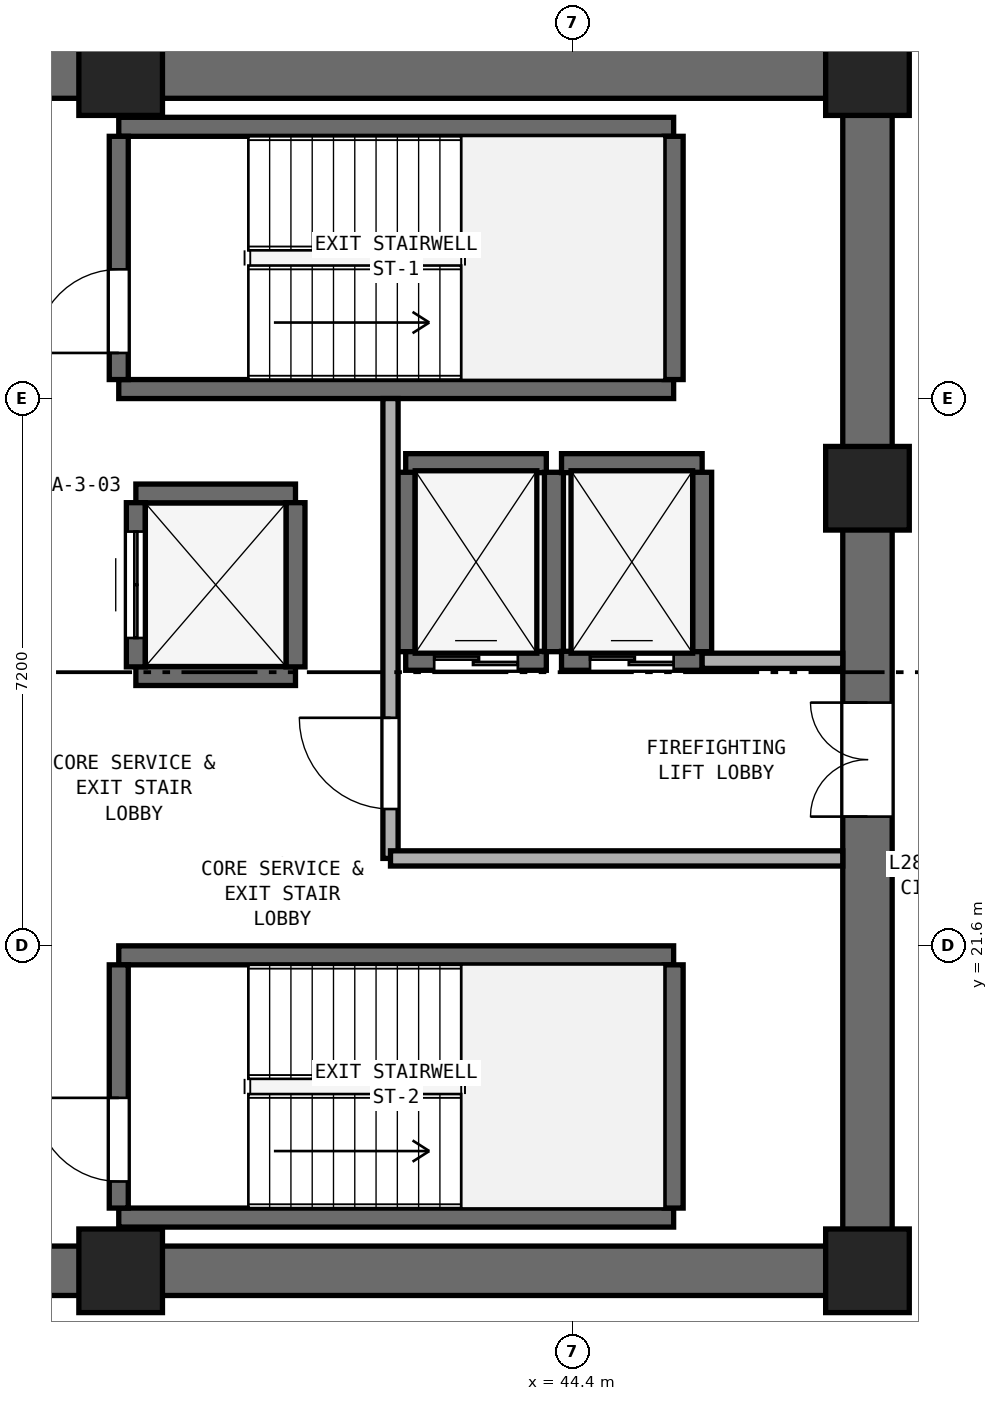
"""IFC4 building model, lengths in metres.
Left out: names, types, materials, properties, quantities, classifications, styles, units other than length and angle.
Written with IfcOpenShell. Run it as: python <this file> out.ifc"""

import sys

from ifc_helpers import new_model, si_unit, direction, frame, frame_2d, origin, origin_2d, place, context, subcontext, project, spatial, rectangle, extrude, element, fill, save


model = new_model("IFC4")
c1 = context("Model", 3, precision=1e-05, world=origin(), true_north=direction((0.0, 1.0)))
c2 = subcontext(c1, "Body", "Model", "MODEL_VIEW")
j1 = project(units=[si_unit("LENGTHUNIT", "METRE"), si_unit("PLANEANGLEUNIT", "RADIAN")], contexts=[c1])
p1 = place(None, origin())
s1 = spatial("IfcSite", under=j1, at=p1, CompositionType="ELEMENT")
p2 = place(p1, origin())
s2 = spatial("IfcBuilding", under=s1, at=p2, CompositionType="ELEMENT")
p3 = place(p2, frame((0.0, 0.0, 112.4)))
s3 = spatial("IfcBuildingStorey", under=s2, at=p3, CompositionType="ELEMENT", Elevation=112.4)
for number, where, z_axis, x_axis in (
    (1, (25.4, 17.325, 0.0), (0.0, 0.0, 1.0), (1.0, 0.0, 0.0)),
    (2, (25.4, 33.075, 0.0), (0.0, 0.0, 1.0), (1.0, 0.0, 0.0)),
):
    element("IfcWall", number, at=place(p3, frame(where, z_axis=z_axis, x_axis=x_axis)), inside=s3, PredefinedType="SHEAR", context=c2, shape_type="SweptSolid", body=[
        extrude(rectangle(XDim=23.2, YDim=0.65, at=frame_2d((11.6, 0.0))), origin(), (0.0, 0.0, 1.0), 3.525),
    ])
p4 = place(p3, frame((48.275, 17.65, 0.0), z_axis=(0.0, 0.0, 1.0), x_axis=(0.0, 1.0, 0.0)))
e3 = element("IfcWall", 3, at=p4, inside=s3, PredefinedType="SHEAR", context=c2, shape_type="SweptSolid", body=[
    extrude(rectangle(XDim=15.1, YDim=0.65, at=frame_2d((7.55, 0.0))), origin(), (0.0, 0.0, 1.0), 3.525),
])
p5 = place(p4, frame((5.65, 0.0, 0.0)))
e4 = element("IfcOpeningElement", 4, at=p5, cuts=e3, PredefinedType="OPENING", context=c2, shape_type="SweptSolid", body=[
    extrude(rectangle(XDim=1.5, YDim=2.15, at=frame_2d((0.75, 1.075))), frame((0.0, 0.335, 0.0), z_axis=(0.0, -1.0, 0.0), x_axis=(1.0, 0.0, 0.0)), (0.0, 0.0, 1.0), 0.67),
])
for number, where, z_axis, x_axis in (
    (5, (38.45, 17.325, 0.0), (0.0, 0.0, 1.0), (1.0, 0.0, 0.0)),
    (6, (48.275, 17.325, 0.0), (0.0, 0.0, 1.0), (1.0, 0.0, 0.0)),
    (7, (48.275, 27.62, 0.0), (0.0, 0.0, 1.0), (1.0, 0.0, 0.0)),
    (8, (48.275, 33.075, 0.0), (0.0, 0.0, 1.0), (1.0, 0.0, 0.0)),
    (9, (38.45, 33.075, 0.0), (0.0, 0.0, 1.0), (1.0, 0.0, 0.0)),
):
    element("IfcColumn", number, at=place(p3, frame(where, z_axis=z_axis, x_axis=x_axis)), inside=s3, PredefinedType="PILASTER", context=c2, shape_type="SweptSolid", body=[
        extrude(rectangle(XDim=1.1, YDim=1.1, at=origin_2d()), origin(), (0.0, 0.0, 1.0), 3.8),
    ])
for number, where, z_axis, x_axis in (
    (10, (38.425, 28.925, 0.0), (0.0, 0.0, 1.0), (1.0, 0.0, 0.0)),
    (11, (38.425, 32.375, 0.0), (0.0, 0.0, 1.0), (1.0, 0.0, 0.0)),
):
    element("IfcWall", number, at=place(p3, frame(where, z_axis=z_axis, x_axis=x_axis)), inside=s3, PredefinedType="SHEAR", context=c2, shape_type="SweptSolid", body=[
        extrude(rectangle(XDim=7.3, YDim=0.25, at=frame_2d((3.65, 0.0))), origin(), (0.0, 0.0, 1.0), 3.525),
    ])
p6 = place(p3, frame((38.425, 29.05, 0.0), z_axis=(0.0, 0.0, 1.0), x_axis=(0.0, 1.0, 0.0)))
e12 = element("IfcWall", 12, at=p6, inside=s3, PredefinedType="SHEAR", context=c2, shape_type="SweptSolid", body=[
    extrude(rectangle(XDim=3.2, YDim=0.25, at=frame_2d((1.6, 0.0))), origin(), (0.0, 0.0, 1.0), 3.525),
])
p7 = place(p6, frame((0.35, 0.0, 0.0)))
e13 = element("IfcOpeningElement", 13, at=p7, cuts=e12, PredefinedType="OPENING", context=c2, shape_type="SweptSolid", body=[
    extrude(rectangle(XDim=1.1, YDim=2.15, at=frame_2d((0.55, 1.075))), frame((0.0, 0.135, 0.0), z_axis=(0.0, -1.0, 0.0), x_axis=(1.0, 0.0, 0.0)), (0.0, 0.0, 1.0), 0.27),
])
p8 = place(p3, frame((45.725, 29.05, 0.0), z_axis=(0.0, 0.0, 1.0), x_axis=(0.0, 1.0, 0.0)))
e14 = element("IfcWall", 14, at=p8, inside=s3, PredefinedType="SHEAR", context=c2, shape_type="SweptSolid", body=[
    extrude(rectangle(XDim=3.2, YDim=0.25, at=frame_2d((1.6, 0.0))), origin(), (0.0, 0.0, 1.0), 3.525),
])
for number, where, z_axis, x_axis in (
    (15, (38.425, 18.025, 0.0), (0.0, 0.0, 1.0), (1.0, 0.0, 0.0)),
    (16, (38.425, 21.475, 0.0), (0.0, 0.0, 1.0), (1.0, 0.0, 0.0)),
):
    element("IfcWall", number, at=place(p3, frame(where, z_axis=z_axis, x_axis=x_axis)), inside=s3, PredefinedType="SHEAR", context=c2, shape_type="SweptSolid", body=[
        extrude(rectangle(XDim=7.3, YDim=0.25, at=frame_2d((3.65, 0.0))), origin(), (0.0, 0.0, 1.0), 3.525),
    ])
p9 = place(p3, frame((38.425, 18.15, 0.0), z_axis=(0.0, 0.0, 1.0), x_axis=(0.0, 1.0, 0.0)))
e17 = element("IfcWall", 17, at=p9, inside=s3, PredefinedType="SHEAR", context=c2, shape_type="SweptSolid", body=[
    extrude(rectangle(XDim=3.2, YDim=0.25, at=frame_2d((1.6, 0.0))), origin(), (0.0, 0.0, 1.0), 3.525),
])
p10 = place(p9, frame((0.35, 0.0, 0.0)))
e18 = element("IfcOpeningElement", 18, at=p10, cuts=e17, PredefinedType="OPENING", context=c2, shape_type="SweptSolid", body=[
    extrude(rectangle(XDim=1.1, YDim=2.15, at=frame_2d((0.55, 1.075))), frame((0.0, 0.135, 0.0), z_axis=(0.0, -1.0, 0.0), x_axis=(1.0, 0.0, 0.0)), (0.0, 0.0, 1.0), 0.27),
])
p11 = place(p3, frame((45.725, 18.15, 0.0), z_axis=(0.0, 0.0, 1.0), x_axis=(0.0, 1.0, 0.0)))
e19 = element("IfcWall", 19, at=p11, inside=s3, PredefinedType="SHEAR", context=c2, shape_type="SweptSolid", body=[
    extrude(rectangle(XDim=3.2, YDim=0.25, at=frame_2d((1.6, 0.0))), origin(), (0.0, 0.0, 1.0), 3.525),
])
p12 = place(p3, frame((42.2, 25.35, 0.0), z_axis=(0.0, 0.0, 1.0), x_axis=(1.0, 0.0, 0.0)))
e20 = element("IfcWall", 20, at=p12, inside=s3, PredefinedType="SHEAR", context=c2, shape_type="SweptSolid", body=[
    extrude(rectangle(XDim=1.85, YDim=0.25, at=frame_2d((0.925, 0.0))), origin(), (0.0, 0.0, 1.0), 3.525),
])
p13 = place(p12, frame((0.375, 0.0, 0.0)))
e21 = element("IfcOpeningElement", 21, at=p13, cuts=e20, PredefinedType="OPENING", context=c2, shape_type="SweptSolid", body=[
    extrude(rectangle(XDim=1.1, YDim=2.15, at=frame_2d((0.55, 1.075))), frame((0.0, 0.135, 0.0), z_axis=(0.0, -1.0, 0.0), x_axis=(1.0, 0.0, 0.0)), (0.0, 0.0, 1.0), 0.27),
])
p14 = place(p3, frame((42.2, 27.95, 0.0), z_axis=(0.0, 0.0, 1.0), x_axis=(1.0, 0.0, 0.0)))
e22 = element("IfcWall", 22, at=p14, inside=s3, PredefinedType="SHEAR", context=c2, shape_type="SweptSolid", body=[
    extrude(rectangle(XDim=1.85, YDim=0.25, at=frame_2d((0.925, 0.0))), origin(), (0.0, 0.0, 1.0), 3.525),
])
for number, where, z_axis, x_axis in (
    (23, (42.2, 25.47, 0.0), (0.0, 0.0, 1.0), (0.0, 1.0, 0.0)),
    (24, (44.15, 25.47, 0.0), (0.0, 0.0, 1.0), (0.0, 1.0, 0.0)),
):
    element("IfcWall", number, at=place(p3, frame(where, z_axis=z_axis, x_axis=x_axis)), inside=s3, PredefinedType="SHEAR", context=c2, shape_type="SweptSolid", body=[
        extrude(rectangle(XDim=2.36, YDim=0.25, at=frame_2d((1.18, 0.0))), origin(), (0.0, 0.0, 1.0), 3.525),
    ])
p15 = place(p3, frame((44.25, 25.35, 0.0), z_axis=(0.0, 0.0, 1.0), x_axis=(1.0, 0.0, 0.0)))
e25 = element("IfcWall", 25, at=p15, inside=s3, PredefinedType="SHEAR", context=c2, shape_type="SweptSolid", body=[
    extrude(rectangle(XDim=1.85, YDim=0.25, at=frame_2d((0.925, 0.0))), origin(), (0.0, 0.0, 1.0), 3.525),
])
p16 = place(p15, frame((0.375, 0.0, 0.0)))
e26 = element("IfcOpeningElement", 26, at=p16, cuts=e25, PredefinedType="OPENING", context=c2, shape_type="SweptSolid", body=[
    extrude(rectangle(XDim=1.1, YDim=2.15, at=frame_2d((0.55, 1.075))), frame((0.0, 0.135, 0.0), z_axis=(0.0, -1.0, 0.0), x_axis=(1.0, 0.0, 0.0)), (0.0, 0.0, 1.0), 0.27),
])
p17 = place(p3, frame((44.25, 27.95, 0.0), z_axis=(0.0, 0.0, 1.0), x_axis=(1.0, 0.0, 0.0)))
e27 = element("IfcWall", 27, at=p17, inside=s3, PredefinedType="SHEAR", context=c2, shape_type="SweptSolid", body=[
    extrude(rectangle(XDim=1.85, YDim=0.25, at=frame_2d((0.925, 0.0))), origin(), (0.0, 0.0, 1.0), 3.525),
])
p18 = place(p3, frame((46.1, 25.47, 0.0), z_axis=(0.0, 0.0, 1.0), x_axis=(0.0, 1.0, 0.0)))
e28 = element("IfcWall", 28, at=p18, inside=s3, PredefinedType="SHEAR", context=c2, shape_type="SweptSolid", body=[
    extrude(rectangle(XDim=2.36, YDim=0.25, at=frame_2d((1.18, 0.0))), origin(), (0.0, 0.0, 1.0), 3.525),
])
for number, where, z_axis, x_axis in (
    (29, (38.65, 25.15, 0.0), (0.0, 0.0, 1.0), (1.0, 0.0, 0.0)),
    (30, (38.65, 27.55, 0.0), (0.0, 0.0, 1.0), (1.0, 0.0, 0.0)),
):
    element("IfcWall", number, at=place(p3, frame(where, z_axis=z_axis, x_axis=x_axis)), inside=s3, PredefinedType="SHEAR", context=c2, shape_type="SweptSolid", body=[
        extrude(rectangle(XDim=2.1, YDim=0.25, at=frame_2d((1.05, 0.0))), origin(), (0.0, 0.0, 1.0), 3.525),
    ])
p19 = place(p3, frame((38.65, 25.27, 0.0), z_axis=(0.0, 0.0, 1.0), x_axis=(0.0, 1.0, 0.0)))
e31 = element("IfcWall", 31, at=p19, inside=s3, PredefinedType="SHEAR", context=c2, shape_type="SweptSolid", body=[
    extrude(rectangle(XDim=2.16, YDim=0.25, at=frame_2d((1.08, 0.0))), origin(), (0.0, 0.0, 1.0), 3.525),
])
p20 = place(p19, frame((0.38, 0.0, 0.0)))
e32 = element("IfcOpeningElement", 32, at=p20, cuts=e31, PredefinedType="OPENING", context=c2, shape_type="SweptSolid", body=[
    extrude(rectangle(XDim=1.4, YDim=2.2, at=frame_2d((0.7, 1.1))), frame((0.0, 0.135, 0.0), z_axis=(0.0, -1.0, 0.0), x_axis=(1.0, 0.0, 0.0)), (0.0, 0.0, 1.0), 0.27),
])
p21 = place(p3, frame((40.75, 25.27, 0.0), z_axis=(0.0, 0.0, 1.0), x_axis=(0.0, 1.0, 0.0)))
e33 = element("IfcWall", 33, at=p21, inside=s3, PredefinedType="SHEAR", context=c2, shape_type="SweptSolid", body=[
    extrude(rectangle(XDim=2.16, YDim=0.25, at=frame_2d((1.08, 0.0))), origin(), (0.0, 0.0, 1.0), 3.525),
])
p22 = place(p3, frame((42.0, 22.75, 0.0), z_axis=(0.0, 0.0, 1.0), x_axis=(0.0, 1.0, 0.0)))
e34 = element("IfcWall", 34, at=p22, inside=s3, PredefinedType="SOLIDWALL", context=c2, shape_type="SweptSolid", body=[
    extrude(rectangle(XDim=6.05, YDim=0.2, at=frame_2d((3.025, 0.0))), origin(), (0.0, 0.0, 1.0), 3.525),
])
p23 = place(p22, frame((0.65, 0.0, 0.0)))
e35 = element("IfcOpeningElement", 35, at=p23, cuts=e34, PredefinedType="OPENING", context=c2, shape_type="SweptSolid", body=[
    extrude(rectangle(XDim=1.2, YDim=2.15, at=frame_2d((0.6, 1.075))), frame((0.0, 0.11, 0.0), z_axis=(0.0, -1.0, 0.0), x_axis=(1.0, 0.0, 0.0)), (0.0, 0.0, 1.0), 0.22),
])
p24 = place(p3, frame((42.0, 22.75, 0.0), z_axis=(0.0, 0.0, 1.0), x_axis=(1.0, 0.0, 0.0)))
e36 = element("IfcWall", 36, at=p24, inside=s3, PredefinedType="SOLIDWALL", context=c2, shape_type="SweptSolid", body=[
    extrude(rectangle(XDim=5.95, YDim=0.2, at=frame_2d((2.975, 0.0))), origin(), (0.0, 0.0, 1.0), 3.525),
])
p25 = place(p3, frame((46.1, 25.35, 0.0), z_axis=(0.0, 0.0, 1.0), x_axis=(1.0, 0.0, 0.0)))
e37 = element("IfcWall", 37, at=p25, inside=s3, PredefinedType="SOLIDWALL", context=c2, shape_type="SweptSolid", body=[
    extrude(rectangle(XDim=1.85, YDim=0.2, at=frame_2d((0.925, 0.0))), origin(), (0.0, 0.0, 1.0), 3.525),
])
p26 = place(p7, origin())
e38 = element("IfcDoor", 38, at=p26, inside=s3, OperationType="SINGLE_SWING_LEFT", PredefinedType="DOOR", context=c2, shape_type="SweptSolid", body=[
    extrude(rectangle(XDim=1.1, YDim=2.15, at=frame_2d((0.55, 1.075))), frame((0.0, 0.025, 0.0), z_axis=(0.0, -1.0, 0.0), x_axis=(1.0, 0.0, 0.0)), (0.0, 0.0, 1.0), 0.05),
])
fill(e13, e38)
p27 = place(p10, origin())
e39 = element("IfcDoor", 39, at=p27, inside=s3, OperationType="SINGLE_SWING_RIGHT", PredefinedType="DOOR", context=c2, shape_type="SweptSolid", body=[
    extrude(rectangle(XDim=1.1, YDim=2.15, at=frame_2d((0.55, 1.075))), frame((0.0, 0.025, 0.0), z_axis=(0.0, -1.0, 0.0), x_axis=(1.0, 0.0, 0.0)), (0.0, 0.0, 1.0), 0.05),
])
fill(e18, e39)
p28 = place(p13, origin())
e40 = element("IfcDoor", 40, at=p28, inside=s3, OperationType="DOUBLE_DOOR_SLIDING", PredefinedType="DOOR", context=c2, shape_type="SweptSolid", body=[
    extrude(rectangle(XDim=1.1, YDim=2.15, at=frame_2d((0.55, 1.075))), frame((0.0, 0.025, 0.0), z_axis=(0.0, -1.0, 0.0), x_axis=(1.0, 0.0, 0.0)), (0.0, 0.0, 1.0), 0.05),
])
fill(e21, e40)
p29 = place(p16, origin())
e41 = element("IfcDoor", 41, at=p29, inside=s3, OperationType="DOUBLE_DOOR_SLIDING", PredefinedType="DOOR", context=c2, shape_type="SweptSolid", body=[
    extrude(rectangle(XDim=1.1, YDim=2.15, at=frame_2d((0.55, 1.075))), frame((0.0, 0.025, 0.0), z_axis=(0.0, -1.0, 0.0), x_axis=(1.0, 0.0, 0.0)), (0.0, 0.0, 1.0), 0.05),
])
fill(e26, e41)
p30 = place(p20, origin())
e42 = element("IfcDoor", 42, at=p30, inside=s3, OperationType="DOUBLE_DOOR_SLIDING", PredefinedType="DOOR", context=c2, shape_type="SweptSolid", body=[
    extrude(rectangle(XDim=1.4, YDim=2.2, at=frame_2d((0.7, 1.1))), frame((0.0, 0.025, 0.0), z_axis=(0.0, -1.0, 0.0), x_axis=(1.0, 0.0, 0.0)), (0.0, 0.0, 1.0), 0.05),
])
fill(e32, e42)
p31 = place(p23, origin())
e43 = element("IfcDoor", 43, at=p31, inside=s3, OperationType="SINGLE_SWING_RIGHT", PredefinedType="DOOR", context=c2, shape_type="SweptSolid", body=[
    extrude(rectangle(XDim=1.2, YDim=2.15, at=frame_2d((0.6, 1.075))), frame((0.0, 0.025, 0.0), z_axis=(0.0, -1.0, 0.0), x_axis=(1.0, 0.0, 0.0)), (0.0, 0.0, 1.0), 0.05),
])
fill(e35, e43)
p32 = place(p5, origin())
e44 = element("IfcDoor", 44, at=p32, inside=s3, OperationType="DOUBLE_DOOR_SINGLE_SWING", PredefinedType="DOOR", context=c2, shape_type="SweptSolid", body=[
    extrude(rectangle(XDim=1.5, YDim=2.15, at=frame_2d((0.75, 1.075))), frame((0.0, 0.025, 0.0), z_axis=(0.0, -1.0, 0.0), x_axis=(1.0, 0.0, 0.0)), (0.0, 0.0, 1.0), 0.05),
])
fill(e4, e44)
save(model, sys.argv[1])
